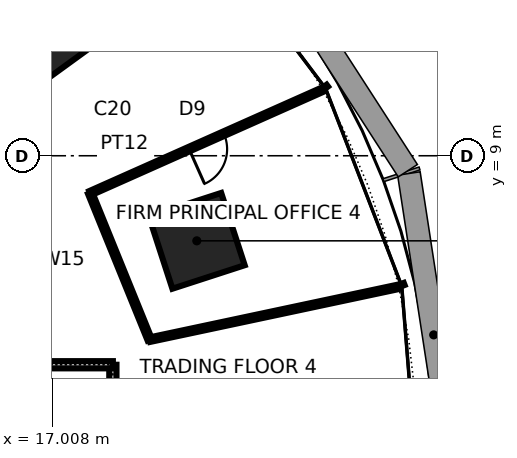
"""IFC4 building model, lengths in metres.
Left out: names, types, materials, properties, quantities, classifications, styles, units other than length and angle.
Written with IfcOpenShell. Run it as: python <this file> out.ifc"""

import sys

from ifc_helpers import new_model, si_unit, direction, frame, frame_2d, origin, origin_2d, place, context, subcontext, project, spatial, rectangle, extrude, element, fill, save


model = new_model("IFC4")
c1 = context("Model", 3, precision=1e-05, world=origin(), true_north=direction((0.0, 1.0)))
c2 = subcontext(c1, "Body", "Model", "MODEL_VIEW")
j1 = project(units=[si_unit("LENGTHUNIT", "METRE"), si_unit("PLANEANGLEUNIT", "RADIAN")], contexts=[c1])
p1 = place(None, origin())
s1 = spatial("IfcSite", under=j1, at=p1, CompositionType="ELEMENT")
p2 = place(p1, origin())
s2 = spatial("IfcBuilding", under=s1, at=p2, CompositionType="ELEMENT")
p3 = place(p2, frame((0.0, 0.0, 65.8)))
s3 = spatial("IfcBuildingStorey", under=s2, at=p3, CompositionType="ELEMENT", Elevation=65.8)
for number, where, z_axis, x_axis in (
    (1, (20.808, 6.761, 0.0), (0.0, 0.0, 1.0), (0.951, 0.309, 0.0)),
    (2, (16.986, 12.341, 0.0), (0.0, 0.0, 1.0), (0.809, 0.588, 0.0)),
):
    element("IfcColumn", number, at=place(p3, frame(where, z_axis=z_axis, x_axis=x_axis)), inside=s3, PredefinedType="COLUMN", context=c2, shape_type="SweptSolid", body=[
        extrude(rectangle(XDim=2.0, YDim=2.0, at=origin_2d()), origin(), (0.0, 0.0, 1.0), 4.2),
    ])
p4 = place(p3, frame((18.6, -3.5, 0.0), z_axis=(0.0, 0.0, 1.0), x_axis=(0.0, 1.0, 0.0)))
e3 = element("IfcWall", 3, at=p4, inside=s3, PredefinedType="SOLIDWALL", context=c2, shape_type="SweptSolid", body=[
    extrude(rectangle(XDim=7.0, YDim=0.19, at=frame_2d((3.5, 0.0))), origin(), (0.0, 0.0, 1.0), 3.586),
])
p5 = place(p4, frame((2.9, 0.0, 0.0)))
e4 = element("IfcOpeningElement", 4, at=p5, cuts=e3, PredefinedType="OPENING", context=c2, shape_type="SweptSolid", body=[
    extrude(rectangle(XDim=1.2, YDim=2.1, at=frame_2d((0.6, 1.05))), frame((0.0, 0.105, 0.0), z_axis=(0.0, -1.0, 0.0), x_axis=(1.0, 0.0, 0.0)), (0.0, 0.0, 1.0), 0.21),
])
p6 = place(p3, frame((18.6, 3.5, 0.0), z_axis=(0.0, 0.0, 1.0), x_axis=(-1.0, 0.0, 0.0)))
e5 = element("IfcWall", 5, at=p6, inside=s3, PredefinedType="SOLIDWALL", context=c2, shape_type="SweptSolid", body=[
    extrude(rectangle(XDim=2.6, YDim=0.19, at=frame_2d((1.3, 0.0))), origin(), (0.0, 0.0, 1.0), 4.04),
])
p7 = place(p3, frame((19.57, 4.16, 0.0), z_axis=(0.0, 0.0, 1.0), x_axis=(0.978146625084, 0.207916280835, 0.0)))
e6 = element("IfcWall", 6, at=p7, inside=s3, PredefinedType="PARTITIONING", context=c2, shape_type="SweptSolid", body=[
    extrude(rectangle(XDim=6.7, YDim=0.12, at=frame_2d((3.35, 0.0))), origin(), (0.0, 0.0, 1.0), 4.04),
])
p8 = place(p3, frame((18.003, 8.015, 0.0), z_axis=(0.0, 0.0, 1.0), x_axis=(0.376482466065, -0.926423743622, 0.0)))
e7 = element("IfcWall", 7, at=p8, inside=s3, PredefinedType="PARTITIONING", context=c2, shape_type="SweptSolid", body=[
    extrude(rectangle(XDim=4.162, YDim=0.12, at=frame_2d((2.081, 0.0))), origin(), (0.0, 0.0, 1.0), 4.04),
])
p9 = place(p3, frame((24.124, 10.74, 0.0), z_axis=(0.0, 0.0, 1.0), x_axis=(-0.91354990356, -0.406726657235, 0.0)))
e8 = element("IfcWall", 8, at=p9, inside=s3, PredefinedType="PARTITIONING", context=c2, shape_type="SweptSolid", body=[
    extrude(rectangle(XDim=6.7, YDim=0.12, at=frame_2d((3.35, 0.0))), origin(), (0.0, 0.0, 1.0), 4.04),
])
p10 = place(p9, frame((2.85, 0.0, 0.0)))
e9 = element("IfcOpeningElement", 9, at=p10, cuts=e8, PredefinedType="OPENING", context=c2, shape_type="SweptSolid", body=[
    extrude(rectangle(XDim=1.0, YDim=2.4, at=frame_2d((0.5, 1.2))), frame((0.0, 0.07, 0.0), z_axis=(0.0, -1.0, 0.0), x_axis=(1.0, 0.0, 0.0)), (0.0, 0.0, 1.0), 0.14),
])
p11 = place(p10, origin())
e10 = element("IfcDoor", 10, at=p11, inside=s3, OperationType="SINGLE_SWING_RIGHT", PredefinedType="DOOR", context=c2, shape_type="SweptSolid", body=[
    extrude(rectangle(XDim=1.0, YDim=2.4, at=frame_2d((0.5, 1.2))), frame((0.0, 0.025, 0.0), z_axis=(0.0, -1.0, 0.0), x_axis=(1.0, 0.0, 0.0)), (0.0, 0.0, 1.0), 0.05),
])
fill(e9, e10)
save(model, sys.argv[1])
